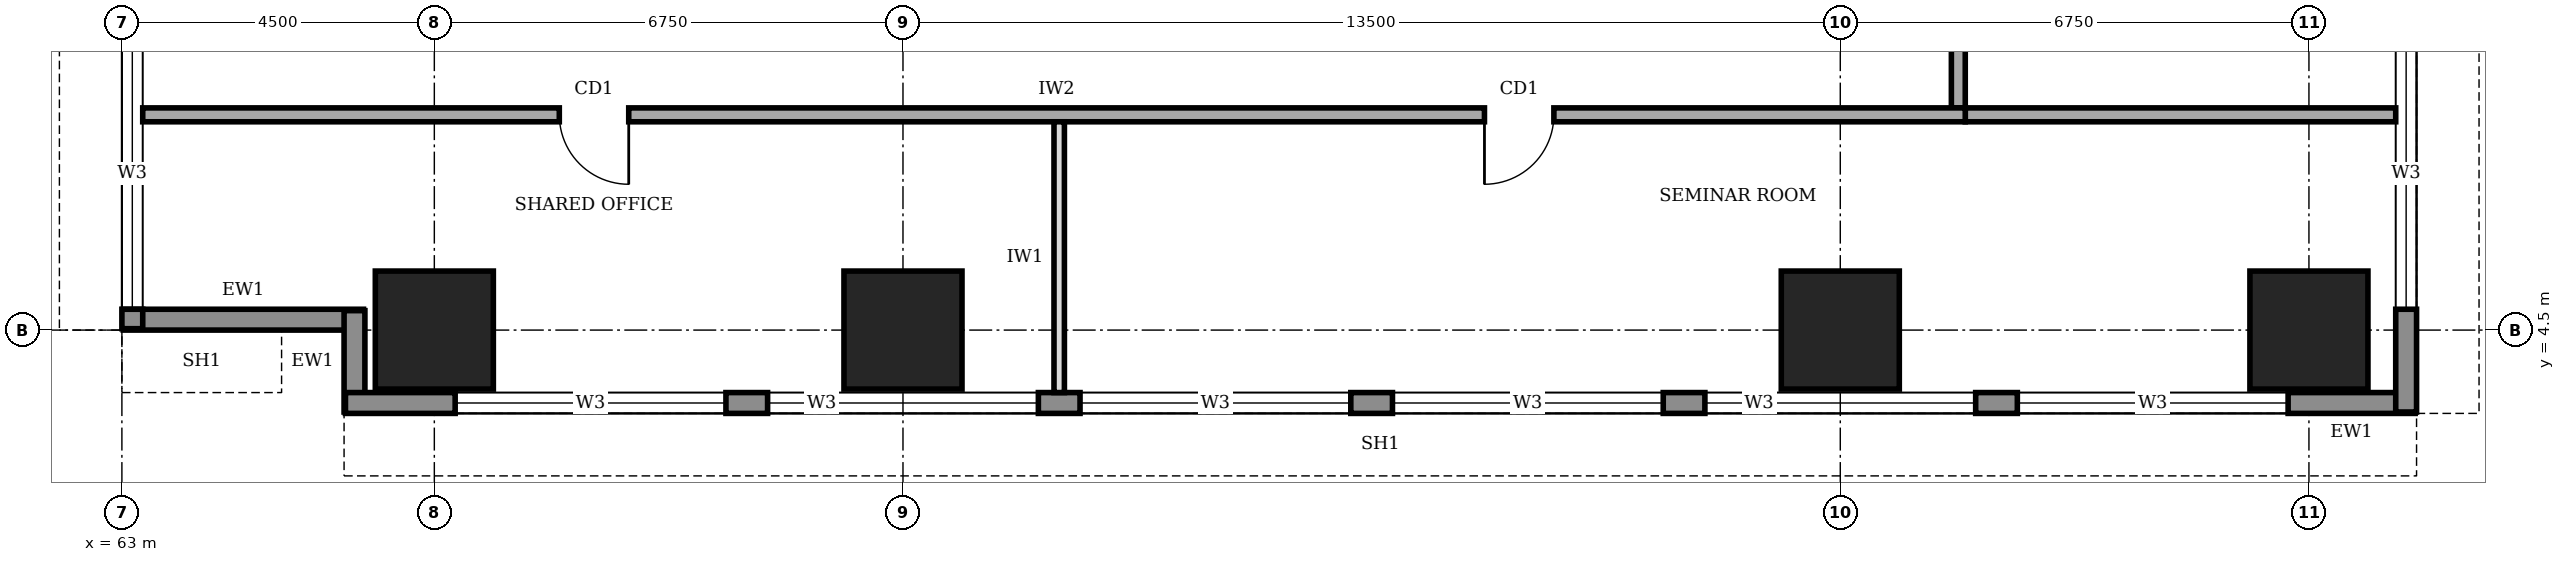
"""IFC4 building model, lengths in metres.
Left out: names, types, materials, properties, quantities, classifications, styles, units other than length and angle.
Written with IfcOpenShell. Run it as: python <this file> out.ifc"""

import sys

from ifc_helpers import new_model, si_unit, direction, frame, frame_2d, origin, origin_2d, place, context, subcontext, project, spatial, rectangle, extrude, element, fill, save


model = new_model("IFC4")
c1 = context("Model", 3, precision=1e-05, world=origin(), true_north=direction((0.0, 1.0)))
c2 = subcontext(c1, "Body", "Model", "MODEL_VIEW")
j1 = project(units=[si_unit("LENGTHUNIT", "METRE"), si_unit("PLANEANGLEUNIT", "RADIAN")], contexts=[c1])
p1 = place(None, origin())
s1 = spatial("IfcSite", under=j1, at=p1, CompositionType="ELEMENT")
p2 = place(p1, origin())
s2 = spatial("IfcBuilding", under=s1, at=p2, CompositionType="ELEMENT")
p3 = place(p2, frame((0.0, 0.0, 85.0)))
s3 = spatial("IfcBuildingStorey", under=s2, at=p3, CompositionType="ELEMENT", Elevation=85.0)
for number, where, z_axis, x_axis in (
    (1, (67.5, 4.5, 0.0), (0.0, 0.0, 1.0), (1.0, 0.0, 0.0)),
    (2, (74.25, 4.5, 0.0), (0.0, 0.0, 1.0), (1.0, 0.0, 0.0)),
    (3, (87.75, 4.5, 0.0), (0.0, 0.0, 1.0), (1.0, 0.0, 0.0)),
    (4, (94.5, 4.5, 0.0), (0.0, 0.0, 1.0), (1.0, 0.0, 0.0)),
):
    element("IfcColumn", number, at=place(p3, frame(where, z_axis=z_axis, x_axis=x_axis)), inside=s3, PredefinedType="COLUMN", context=c2, shape_type="SweptSolid", body=[
        extrude(rectangle(XDim=1.7, YDim=1.7, at=origin_2d()), origin(), (0.0, 0.0, 1.0), 4.0),
    ])
p4 = place(p3, frame((63.02, 4.65, 0.0), z_axis=(0.0, 0.0, 1.0), x_axis=(1.0, 0.0, 0.0)))
e5 = element("IfcWall", 5, at=p4, inside=s3, PredefinedType="STANDARD", context=c2, shape_type="SweptSolid", body=[
    extrude(rectangle(XDim=3.46, YDim=0.3, at=frame_2d((1.73, 0.0))), origin(), (0.0, 0.0, 1.0), 2.85),
])
p5 = place(p3, frame((66.35, 4.78, 0.0), z_axis=(0.0, 0.0, 1.0), x_axis=(0.0, -1.0, 0.0)))
e6 = element("IfcWall", 6, at=p5, inside=s3, PredefinedType="STANDARD", context=c2, shape_type="SweptSolid", body=[
    extrude(rectangle(XDim=1.46, YDim=0.3, at=frame_2d((0.73, 0.0))), origin(), (0.0, 0.0, 1.0), 3.75),
])
p6 = place(p3, frame((66.22, 3.45, 0.0), z_axis=(0.0, 0.0, 1.0), x_axis=(1.0, 0.0, 0.0)))
e7 = element("IfcWall", 7, at=p6, inside=s3, PredefinedType="STANDARD", context=c2, shape_type="SweptSolid", body=[
    extrude(rectangle(XDim=29.81, YDim=0.3, at=frame_2d((14.905, 0.0))), origin(), (0.0, 0.0, 1.0), 3.75),
])
p7 = place(p6, frame((1.58, 0.0, 0.95)))
e8 = element("IfcOpeningElement", 8, at=p7, cuts=e7, PredefinedType="OPENING", context=c2, shape_type="SweptSolid", body=[
    extrude(rectangle(XDim=3.9, YDim=1.8, at=frame_2d((1.95, 0.9))), frame((0.0, 0.16, 0.0), z_axis=(0.0, -1.0, 0.0), x_axis=(1.0, 0.0, 0.0)), (0.0, 0.0, 1.0), 0.32),
])
p8 = place(p6, frame((6.08, 0.0, 0.95)))
e9 = element("IfcOpeningElement", 9, at=p8, cuts=e7, PredefinedType="OPENING", context=c2, shape_type="SweptSolid", body=[
    extrude(rectangle(XDim=3.9, YDim=1.8, at=frame_2d((1.95, 0.9))), frame((0.0, 0.16, 0.0), z_axis=(0.0, -1.0, 0.0), x_axis=(1.0, 0.0, 0.0)), (0.0, 0.0, 1.0), 0.32),
])
p9 = place(p6, frame((10.58, 0.0, 0.95)))
e10 = element("IfcOpeningElement", 10, at=p9, cuts=e7, PredefinedType="OPENING", context=c2, shape_type="SweptSolid", body=[
    extrude(rectangle(XDim=3.9, YDim=1.8, at=frame_2d((1.95, 0.9))), frame((0.0, 0.16, 0.0), z_axis=(0.0, -1.0, 0.0), x_axis=(1.0, 0.0, 0.0)), (0.0, 0.0, 1.0), 0.32),
])
p10 = place(p6, frame((15.08, 0.0, 0.95)))
e11 = element("IfcOpeningElement", 11, at=p10, cuts=e7, PredefinedType="OPENING", context=c2, shape_type="SweptSolid", body=[
    extrude(rectangle(XDim=3.9, YDim=1.8, at=frame_2d((1.95, 0.9))), frame((0.0, 0.16, 0.0), z_axis=(0.0, -1.0, 0.0), x_axis=(1.0, 0.0, 0.0)), (0.0, 0.0, 1.0), 0.32),
])
p11 = place(p6, frame((19.58, 0.0, 0.95)))
e12 = element("IfcOpeningElement", 12, at=p11, cuts=e7, PredefinedType="OPENING", context=c2, shape_type="SweptSolid", body=[
    extrude(rectangle(XDim=3.9, YDim=1.8, at=frame_2d((1.95, 0.9))), frame((0.0, 0.16, 0.0), z_axis=(0.0, -1.0, 0.0), x_axis=(1.0, 0.0, 0.0)), (0.0, 0.0, 1.0), 0.32),
])
p12 = place(p6, frame((24.08, 0.0, 0.95)))
e13 = element("IfcOpeningElement", 13, at=p12, cuts=e7, PredefinedType="OPENING", context=c2, shape_type="SweptSolid", body=[
    extrude(rectangle(XDim=3.9, YDim=1.8, at=frame_2d((1.95, 0.9))), frame((0.0, 0.16, 0.0), z_axis=(0.0, -1.0, 0.0), x_axis=(1.0, 0.0, 0.0)), (0.0, 0.0, 1.0), 0.32),
])
p13 = place(p3, frame((95.9, 3.32, 0.0), z_axis=(0.0, 0.0, 1.0), x_axis=(0.0, 1.0, 0.0)))
e14 = element("IfcWall", 14, at=p13, inside=s3, PredefinedType="STANDARD", context=c2, shape_type="SweptSolid", body=[
    extrude(rectangle(XDim=33.96, YDim=0.3, at=frame_2d((16.98, 0.0))), origin(), (0.0, 0.0, 1.0), 3.75),
])
p14 = place(p13, frame((1.48, 0.0, 0.95)))
e15 = element("IfcOpeningElement", 15, at=p14, cuts=e14, PredefinedType="OPENING", context=c2, shape_type="SweptSolid", body=[
    extrude(rectangle(XDim=3.9, YDim=1.8, at=frame_2d((1.95, 0.9))), frame((0.0, 0.16, 0.0), z_axis=(0.0, -1.0, 0.0), x_axis=(1.0, 0.0, 0.0)), (0.0, 0.0, 1.0), 0.32),
])
p15 = place(p13, frame((5.98, 0.0, 0.95)))
e16 = element("IfcOpeningElement", 16, at=p15, cuts=e14, PredefinedType="OPENING", context=c2, shape_type="SweptSolid", body=[
    extrude(rectangle(XDim=3.9, YDim=1.8, at=frame_2d((1.95, 0.9))), frame((0.0, 0.16, 0.0), z_axis=(0.0, -1.0, 0.0), x_axis=(1.0, 0.0, 0.0)), (0.0, 0.0, 1.0), 0.32),
])
p16 = place(p13, frame((10.48, 0.0, 0.95)))
e17 = element("IfcOpeningElement", 17, at=p16, cuts=e14, PredefinedType="OPENING", context=c2, shape_type="SweptSolid", body=[
    extrude(rectangle(XDim=3.9, YDim=1.8, at=frame_2d((1.95, 0.9))), frame((0.0, 0.16, 0.0), z_axis=(0.0, -1.0, 0.0), x_axis=(1.0, 0.0, 0.0)), (0.0, 0.0, 1.0), 0.32),
])
p17 = place(p13, frame((14.98, 0.0, 0.95)))
e18 = element("IfcOpeningElement", 18, at=p17, cuts=e14, PredefinedType="OPENING", context=c2, shape_type="SweptSolid", body=[
    extrude(rectangle(XDim=3.9, YDim=1.8, at=frame_2d((1.95, 0.9))), frame((0.0, 0.16, 0.0), z_axis=(0.0, -1.0, 0.0), x_axis=(1.0, 0.0, 0.0)), (0.0, 0.0, 1.0), 0.32),
])
p18 = place(p13, frame((19.48, 0.0, 0.95)))
e19 = element("IfcOpeningElement", 19, at=p18, cuts=e14, PredefinedType="OPENING", context=c2, shape_type="SweptSolid", body=[
    extrude(rectangle(XDim=3.9, YDim=1.8, at=frame_2d((1.95, 0.9))), frame((0.0, 0.16, 0.0), z_axis=(0.0, -1.0, 0.0), x_axis=(1.0, 0.0, 0.0)), (0.0, 0.0, 1.0), 0.32),
])
p19 = place(p13, frame((23.98, 0.0, 0.95)))
e20 = element("IfcOpeningElement", 20, at=p19, cuts=e14, PredefinedType="OPENING", context=c2, shape_type="SweptSolid", body=[
    extrude(rectangle(XDim=3.9, YDim=1.8, at=frame_2d((1.95, 0.9))), frame((0.0, 0.16, 0.0), z_axis=(0.0, -1.0, 0.0), x_axis=(1.0, 0.0, 0.0)), (0.0, 0.0, 1.0), 0.32),
])
p20 = place(p13, frame((28.48, 0.0, 0.95)))
e21 = element("IfcOpeningElement", 21, at=p20, cuts=e14, PredefinedType="OPENING", context=c2, shape_type="SweptSolid", body=[
    extrude(rectangle(XDim=3.9, YDim=1.8, at=frame_2d((1.95, 0.9))), frame((0.0, 0.16, 0.0), z_axis=(0.0, -1.0, 0.0), x_axis=(1.0, 0.0, 0.0)), (0.0, 0.0, 1.0), 0.32),
])
p21 = place(p3, frame((63.15, 35.98, 0.0), z_axis=(0.0, 0.0, 1.0), x_axis=(0.0, -1.0, 0.0)))
e22 = element("IfcWall", 22, at=p21, inside=s3, PredefinedType="STANDARD", context=c2, shape_type="SweptSolid", body=[
    extrude(rectangle(XDim=31.46, YDim=0.3, at=frame_2d((15.73, 0.0))), origin(), (0.0, 0.0, 1.0), 3.75),
])
p22 = place(p21, frame((27.28, 0.0, 0.95)))
e23 = element("IfcOpeningElement", 23, at=p22, cuts=e22, PredefinedType="OPENING", context=c2, shape_type="SweptSolid", body=[
    extrude(rectangle(XDim=3.9, YDim=1.8, at=frame_2d((1.95, 0.9))), frame((0.0, 0.16, 0.0), z_axis=(0.0, -1.0, 0.0), x_axis=(1.0, 0.0, 0.0)), (0.0, 0.0, 1.0), 0.32),
])
p23 = place(p21, frame((22.78, 0.0, 0.95)))
e24 = element("IfcOpeningElement", 24, at=p23, cuts=e22, PredefinedType="OPENING", context=c2, shape_type="SweptSolid", body=[
    extrude(rectangle(XDim=3.9, YDim=1.8, at=frame_2d((1.95, 0.9))), frame((0.0, 0.16, 0.0), z_axis=(0.0, -1.0, 0.0), x_axis=(1.0, 0.0, 0.0)), (0.0, 0.0, 1.0), 0.32),
])
p24 = place(p21, frame((18.28, 0.0, 0.95)))
e25 = element("IfcOpeningElement", 25, at=p24, cuts=e22, PredefinedType="OPENING", context=c2, shape_type="SweptSolid", body=[
    extrude(rectangle(XDim=3.9, YDim=1.8, at=frame_2d((1.95, 0.9))), frame((0.0, 0.16, 0.0), z_axis=(0.0, -1.0, 0.0), x_axis=(1.0, 0.0, 0.0)), (0.0, 0.0, 1.0), 0.32),
])
p25 = place(p21, frame((13.78, 0.0, 0.95)))
e26 = element("IfcOpeningElement", 26, at=p25, cuts=e22, PredefinedType="OPENING", context=c2, shape_type="SweptSolid", body=[
    extrude(rectangle(XDim=3.9, YDim=1.8, at=frame_2d((1.95, 0.9))), frame((0.0, 0.16, 0.0), z_axis=(0.0, -1.0, 0.0), x_axis=(1.0, 0.0, 0.0)), (0.0, 0.0, 1.0), 0.32),
])
p26 = place(p21, frame((9.28, 0.0, 0.95)))
e27 = element("IfcOpeningElement", 27, at=p26, cuts=e22, PredefinedType="OPENING", context=c2, shape_type="SweptSolid", body=[
    extrude(rectangle(XDim=3.9, YDim=1.8, at=frame_2d((1.95, 0.9))), frame((0.0, 0.16, 0.0), z_axis=(0.0, -1.0, 0.0), x_axis=(1.0, 0.0, 0.0)), (0.0, 0.0, 1.0), 0.32),
])
p27 = place(p21, frame((4.78, 0.0, 0.95)))
e28 = element("IfcOpeningElement", 28, at=p27, cuts=e22, PredefinedType="OPENING", context=c2, shape_type="SweptSolid", body=[
    extrude(rectangle(XDim=3.9, YDim=1.8, at=frame_2d((1.95, 0.9))), frame((0.0, 0.16, 0.0), z_axis=(0.0, -1.0, 0.0), x_axis=(1.0, 0.0, 0.0)), (0.0, 0.0, 1.0), 0.32),
])
p28 = place(p3, frame((63.3, 7.6, 0.0), z_axis=(0.0, 0.0, 1.0), x_axis=(1.0, 0.0, 0.0)))
e29 = element("IfcWall", 29, at=p28, inside=s3, PredefinedType="SOLIDWALL", context=c2, shape_type="SweptSolid", body=[
    extrude(rectangle(XDim=26.25, YDim=0.2, at=frame_2d((13.125, 0.0))), origin(), (0.0, 0.0, 1.0), 3.75),
])
p29 = place(p28, frame((6.0, 0.0, 0.0)))
e30 = element("IfcOpeningElement", 30, at=p29, cuts=e29, PredefinedType="OPENING", context=c2, shape_type="SweptSolid", body=[
    extrude(rectangle(XDim=1.0, YDim=2.1, at=frame_2d((0.5, 1.05))), frame((0.0, 0.11, 0.0), z_axis=(0.0, -1.0, 0.0), x_axis=(1.0, 0.0, 0.0)), (0.0, 0.0, 1.0), 0.22),
])
p30 = place(p28, frame((19.325, 0.0, 0.0)))
e31 = element("IfcOpeningElement", 31, at=p30, cuts=e29, PredefinedType="OPENING", context=c2, shape_type="SweptSolid", body=[
    extrude(rectangle(XDim=1.0, YDim=2.1, at=frame_2d((0.5, 1.05))), frame((0.0, 0.11, 0.0), z_axis=(0.0, -1.0, 0.0), x_axis=(1.0, 0.0, 0.0)), (0.0, 0.0, 1.0), 0.22),
])
p31 = place(p3, frame((89.45, 7.7, 0.0), z_axis=(0.0, 0.0, 1.0), x_axis=(0.0, 1.0, 0.0)))
e32 = element("IfcWall", 32, at=p31, inside=s3, PredefinedType="SOLIDWALL", context=c2, shape_type="SweptSolid", body=[
    extrude(rectangle(XDim=25.3, YDim=0.2, at=frame_2d((12.65, 0.0))), origin(), (0.0, 0.0, 1.0), 3.75),
])
p32 = place(p31, frame((2.3, 0.0, 0.0)))
e33 = element("IfcOpeningElement", 33, at=p32, cuts=e32, PredefinedType="OPENING", context=c2, shape_type="SweptSolid", body=[
    extrude(rectangle(XDim=1.0, YDim=2.1, at=frame_2d((0.5, 1.05))), frame((0.0, 0.11, 0.0), z_axis=(0.0, -1.0, 0.0), x_axis=(1.0, 0.0, 0.0)), (0.0, 0.0, 1.0), 0.22),
])
p33 = place(p31, frame((6.4, 0.0, 0.0)))
e34 = element("IfcOpeningElement", 34, at=p33, cuts=e32, PredefinedType="OPENING", context=c2, shape_type="SweptSolid", body=[
    extrude(rectangle(XDim=1.0, YDim=2.1, at=frame_2d((0.5, 1.05))), frame((0.0, 0.11, 0.0), z_axis=(0.0, -1.0, 0.0), x_axis=(1.0, 0.0, 0.0)), (0.0, 0.0, 1.0), 0.22),
])
p34 = place(p31, frame((9.5, 0.0, 0.0)))
e35 = element("IfcOpeningElement", 35, at=p34, cuts=e32, PredefinedType="OPENING", context=c2, shape_type="SweptSolid", body=[
    extrude(rectangle(XDim=0.9, YDim=2.1, at=frame_2d((0.45, 1.05))), frame((0.0, 0.11, 0.0), z_axis=(0.0, -1.0, 0.0), x_axis=(1.0, 0.0, 0.0)), (0.0, 0.0, 1.0), 0.22),
])
p35 = place(p31, frame((12.55, 0.0, 0.0)))
e36 = element("IfcOpeningElement", 36, at=p35, cuts=e32, PredefinedType="OPENING", context=c2, shape_type="SweptSolid", body=[
    extrude(rectangle(XDim=0.9, YDim=2.1, at=frame_2d((0.45, 1.05))), frame((0.0, 0.11, 0.0), z_axis=(0.0, -1.0, 0.0), x_axis=(1.0, 0.0, 0.0)), (0.0, 0.0, 1.0), 0.22),
])
p36 = place(p31, frame((17.25, 0.0, 0.0)))
e37 = element("IfcOpeningElement", 37, at=p36, cuts=e32, PredefinedType="OPENING", context=c2, shape_type="SweptSolid", body=[
    extrude(rectangle(XDim=0.9, YDim=2.1, at=frame_2d((0.45, 1.05))), frame((0.0, 0.11, 0.0), z_axis=(0.0, -1.0, 0.0), x_axis=(1.0, 0.0, 0.0)), (0.0, 0.0, 1.0), 0.22),
])
p37 = place(p31, frame((14.6, 0.0, 0.0)))
e38 = element("IfcOpeningElement", 38, at=p37, cuts=e32, PredefinedType="OPENING", context=c2, shape_type="SweptSolid", body=[
    extrude(rectangle(XDim=1.0, YDim=2.1, at=frame_2d((0.5, 1.05))), frame((0.0, 0.11, 0.0), z_axis=(0.0, -1.0, 0.0), x_axis=(1.0, 0.0, 0.0)), (0.0, 0.0, 1.0), 0.22),
])
p38 = place(p31, frame((21.8, 0.0, 0.0)))
e39 = element("IfcOpeningElement", 39, at=p38, cuts=e32, PredefinedType="OPENING", context=c2, shape_type="SweptSolid", body=[
    extrude(rectangle(XDim=1.0, YDim=2.1, at=frame_2d((0.5, 1.05))), frame((0.0, 0.11, 0.0), z_axis=(0.0, -1.0, 0.0), x_axis=(1.0, 0.0, 0.0)), (0.0, 0.0, 1.0), 0.22),
])
p39 = place(p3, frame((89.55, 7.6, 0.0), z_axis=(0.0, 0.0, 1.0), x_axis=(1.0, 0.0, 0.0)))
e40 = element("IfcWall", 40, at=p39, inside=s3, PredefinedType="SOLIDWALL", context=c2, shape_type="SweptSolid", body=[
    extrude(rectangle(XDim=6.2, YDim=0.2, at=frame_2d((3.1, 0.0))), origin(), (0.0, 0.0, 1.0), 3.75),
])
p40 = place(p3, frame((76.5, 3.6, 0.0), z_axis=(0.0, 0.0, 1.0), x_axis=(0.0, 1.0, 0.0)))
e41 = element("IfcWall", 41, at=p40, inside=s3, PredefinedType="PARTITIONING", context=c2, shape_type="SweptSolid", body=[
    extrude(rectangle(XDim=3.9, YDim=0.15, at=frame_2d((1.95, 0.0))), origin(), (0.0, 0.0, 1.0), 3.75),
])
p41 = place(p7, origin())
e42 = element("IfcWindow", 42, at=p41, inside=s3, PartitioningType="SINGLE_PANEL", PredefinedType="WINDOW", context=c2, shape_type="SweptSolid", body=[
    extrude(rectangle(XDim=3.9, YDim=1.8, at=frame_2d((1.95, 0.9))), frame((0.0, 0.03, 0.0), z_axis=(0.0, -1.0, 0.0), x_axis=(1.0, 0.0, 0.0)), (0.0, 0.0, 1.0), 0.06),
])
fill(e8, e42)
p42 = place(p8, origin())
e43 = element("IfcWindow", 43, at=p42, inside=s3, PartitioningType="SINGLE_PANEL", PredefinedType="WINDOW", context=c2, shape_type="SweptSolid", body=[
    extrude(rectangle(XDim=3.9, YDim=1.8, at=frame_2d((1.95, 0.9))), frame((0.0, 0.03, 0.0), z_axis=(0.0, -1.0, 0.0), x_axis=(1.0, 0.0, 0.0)), (0.0, 0.0, 1.0), 0.06),
])
fill(e9, e43)
p43 = place(p9, origin())
e44 = element("IfcWindow", 44, at=p43, inside=s3, PartitioningType="SINGLE_PANEL", PredefinedType="WINDOW", context=c2, shape_type="SweptSolid", body=[
    extrude(rectangle(XDim=3.9, YDim=1.8, at=frame_2d((1.95, 0.9))), frame((0.0, 0.03, 0.0), z_axis=(0.0, -1.0, 0.0), x_axis=(1.0, 0.0, 0.0)), (0.0, 0.0, 1.0), 0.06),
])
fill(e10, e44)
p44 = place(p10, origin())
e45 = element("IfcWindow", 45, at=p44, inside=s3, PartitioningType="SINGLE_PANEL", PredefinedType="WINDOW", context=c2, shape_type="SweptSolid", body=[
    extrude(rectangle(XDim=3.9, YDim=1.8, at=frame_2d((1.95, 0.9))), frame((0.0, 0.03, 0.0), z_axis=(0.0, -1.0, 0.0), x_axis=(1.0, 0.0, 0.0)), (0.0, 0.0, 1.0), 0.06),
])
fill(e11, e45)
p45 = place(p11, origin())
e46 = element("IfcWindow", 46, at=p45, inside=s3, PartitioningType="SINGLE_PANEL", PredefinedType="WINDOW", context=c2, shape_type="SweptSolid", body=[
    extrude(rectangle(XDim=3.9, YDim=1.8, at=frame_2d((1.95, 0.9))), frame((0.0, 0.03, 0.0), z_axis=(0.0, -1.0, 0.0), x_axis=(1.0, 0.0, 0.0)), (0.0, 0.0, 1.0), 0.06),
])
fill(e12, e46)
p46 = place(p12, origin())
e47 = element("IfcWindow", 47, at=p46, inside=s3, PartitioningType="SINGLE_PANEL", PredefinedType="WINDOW", context=c2, shape_type="SweptSolid", body=[
    extrude(rectangle(XDim=3.9, YDim=1.8, at=frame_2d((1.95, 0.9))), frame((0.0, 0.03, 0.0), z_axis=(0.0, -1.0, 0.0), x_axis=(1.0, 0.0, 0.0)), (0.0, 0.0, 1.0), 0.06),
])
fill(e13, e47)
p47 = place(p14, origin())
e48 = element("IfcWindow", 48, at=p47, inside=s3, PartitioningType="SINGLE_PANEL", PredefinedType="WINDOW", context=c2, shape_type="SweptSolid", body=[
    extrude(rectangle(XDim=3.9, YDim=1.8, at=frame_2d((1.95, 0.9))), frame((0.0, 0.03, 0.0), z_axis=(0.0, -1.0, 0.0), x_axis=(1.0, 0.0, 0.0)), (0.0, 0.0, 1.0), 0.06),
])
fill(e15, e48)
p48 = place(p22, origin())
e49 = element("IfcWindow", 49, at=p48, inside=s3, PartitioningType="SINGLE_PANEL", PredefinedType="WINDOW", context=c2, shape_type="SweptSolid", body=[
    extrude(rectangle(XDim=3.9, YDim=1.8, at=frame_2d((1.95, 0.9))), frame((0.0, 0.03, 0.0), z_axis=(0.0, -1.0, 0.0), x_axis=(1.0, 0.0, 0.0)), (0.0, 0.0, 1.0), 0.06),
])
fill(e23, e49)
p49 = place(p29, frame((1.0, 0.0, 0.0), z_axis=(0.0, 0.0, 1.0), x_axis=(-1.0, 0.0, 0.0)))
e50 = element("IfcDoor", 50, at=p49, inside=s3, OperationType="SINGLE_SWING_LEFT", PredefinedType="DOOR", context=c2, shape_type="SweptSolid", body=[
    extrude(rectangle(XDim=1.0, YDim=2.1, at=frame_2d((0.5, 1.05))), frame((0.0, 0.025, 0.0), z_axis=(0.0, -1.0, 0.0), x_axis=(1.0, 0.0, 0.0)), (0.0, 0.0, 1.0), 0.05),
])
fill(e30, e50)
p50 = place(p30, frame((1.0, 0.0, 0.0), z_axis=(0.0, 0.0, 1.0), x_axis=(-1.0, 0.0, 0.0)))
e51 = element("IfcDoor", 51, at=p50, inside=s3, OperationType="SINGLE_SWING_RIGHT", PredefinedType="DOOR", context=c2, shape_type="SweptSolid", body=[
    extrude(rectangle(XDim=1.0, YDim=2.1, at=frame_2d((0.5, 1.05))), frame((0.0, 0.025, 0.0), z_axis=(0.0, -1.0, 0.0), x_axis=(1.0, 0.0, 0.0)), (0.0, 0.0, 1.0), 0.05),
])
fill(e31, e51)
save(model, sys.argv[1])
